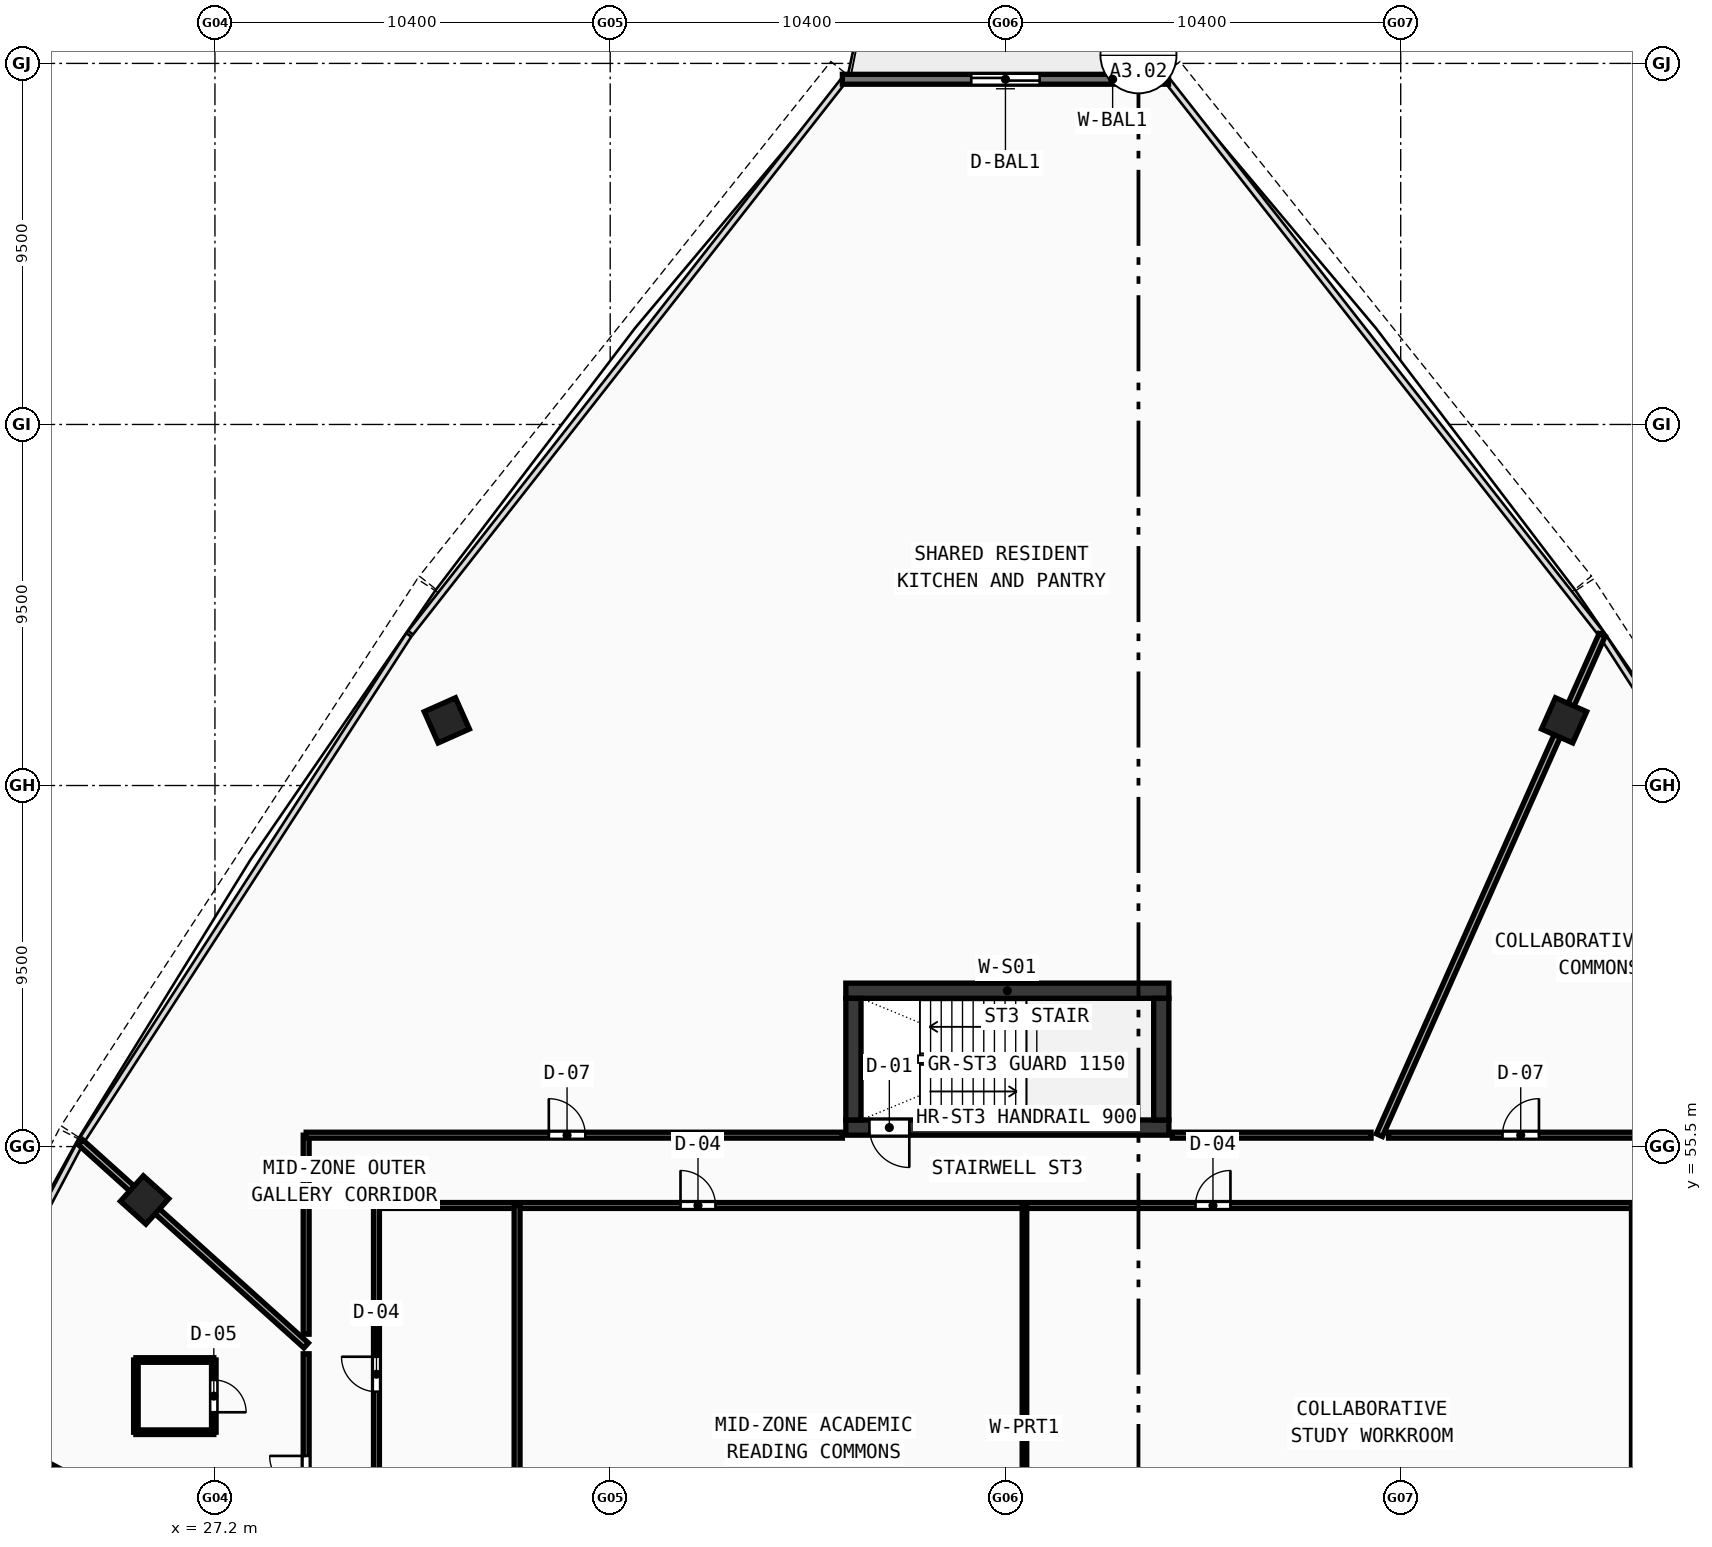
"""IFC4 building model, lengths in metres.
Left out: names, types, materials, properties, quantities, classifications, styles, units other than length and angle.
Written with IfcOpenShell. Run it as: python <this file> out.ifc"""

import sys

from ifc_helpers import new_model, si_unit, direction, frame, frame_2d, origin, origin_with_axes, origin_2d, place, context, subcontext, project, spatial, rectangle, hollow_rectangle, extrude, source, transform, mapped, element, fill, save


model = new_model("IFC4")
c1 = context("Model", 3, precision=1e-05, world=origin(), true_north=direction((0.0, 1.0)))
c2 = subcontext(c1, "Body", "Model", "MODEL_VIEW")
j1 = project(units=[si_unit("LENGTHUNIT", "METRE"), si_unit("PLANEANGLEUNIT", "RADIAN")], contexts=[c1])
p1 = place(None, origin())
s1 = spatial("IfcSite", under=j1, at=p1, CompositionType="ELEMENT")
p2 = place(p1, origin())
s2 = spatial("IfcBuilding", under=s1, at=p2, CompositionType="ELEMENT")
p3 = place(p2, frame((0.0, 0.0, 184.76)))
s3 = spatial("IfcBuildingStorey", under=s2, at=p3, CompositionType="ELEMENT", Elevation=184.76)
p4 = place(p3, frame((43.8, 59.6, 0.0), z_axis=(0.0, 0.0, 1.0), x_axis=(1.0, 0.0, 0.0)))
e1 = element("IfcWall", 1, at=p4, inside=s3, PredefinedType="SHEAR", context=c2, shape_type="SweptSolid", body=[
    extrude(rectangle(XDim=8.5, YDim=0.4, at=frame_2d((4.25, 0.0))), origin(), (0.0, 0.0, 1.0), 3.54),
])
p5 = place(p3, frame((43.8, 56.0, 0.0), z_axis=(0.0, 0.0, 1.0), x_axis=(1.0, 0.0, 0.0)))
e2 = element("IfcWall", 2, at=p5, inside=s3, PredefinedType="SHEAR", context=c2, shape_type="SweptSolid", body=[
    extrude(rectangle(XDim=8.5, YDim=0.4, at=frame_2d((4.25, 0.0))), origin(), (0.0, 0.0, 1.0), 3.54),
])
p6 = place(p5, frame((0.62, 0.0, 0.0)))
e3 = element("IfcOpeningElement", 3, at=p6, cuts=e2, PredefinedType="OPENING", context=c2, shape_type="SweptSolid", body=[
    extrude(rectangle(XDim=1.05, YDim=2.1, at=frame_2d((0.525, 1.05))), frame((0.0, 0.21, 0.0), z_axis=(0.0, -1.0, 0.0), x_axis=(1.0, 0.0, 0.0)), (0.0, 0.0, 1.0), 0.42),
])
for number, where, z_axis, x_axis in (
    (4, (44.0, 56.2, 0.0), (0.0, 0.0, 1.0), (0.0, 1.0, 0.0)),
    (5, (52.1, 56.2, 0.0), (0.0, 0.0, 1.0), (0.0, 1.0, 0.0)),
):
    element("IfcWall", number, at=place(p3, frame(where, z_axis=z_axis, x_axis=x_axis)), inside=s3, PredefinedType="SHEAR", context=c2, shape_type="SweptSolid", body=[
        extrude(rectangle(XDim=3.2, YDim=0.4, at=frame_2d((1.6, 0.0))), origin(), (0.0, 0.0, 1.0), 3.54),
    ])
m1 = source(origin(), c2, "Body", "SweptSolid", [
    extrude(hollow_rectangle(XDim=0.9, YDim=0.9, WallThickness=0.036, at=origin_2d()), origin(), (0.0, 0.0, 1.0), 3.8),
])
for number, where, z_axis, x_axis in (
    (6, (62.699, 66.715, -0.26), (0.0, 0.0, 1.0), (-0.914, 0.407, 0.0)),
    (7, (33.301, 66.715, -0.26), (0.0, 0.0, 1.0), (-0.914, -0.407, 0.0)),
    (8, (25.349, 54.095, -0.26), (0.0, 0.0, 1.0), (-0.669, -0.743, 0.0)),
):
    element("IfcColumn", number, at=place(p3, frame(where, z_axis=z_axis, x_axis=x_axis)), inside=s3, PredefinedType="COLUMN", context=c2, shape_type="MappedRepresentation", body=[
        mapped(m1, transform((0.0, 0.0, 0.0), scale=1.0)),
    ])
p7 = place(p3, frame((52.29, 83.583, 0.0), z_axis=(0.0, 0.0, 1.0), x_axis=(-1.0, 0.0, 0.0)))
e9 = element("IfcWall", 9, at=p7, inside=s3, PredefinedType="STANDARD", context=c2, shape_type="SweptSolid", body=[
    extrude(rectangle(XDim=8.581, YDim=0.26, at=frame_2d((4.29, 0.0))), origin(), (0.0, 0.0, 1.0), 3.54),
])
p8 = place(p7, frame((3.39, 0.0, 0.0)))
e10 = element("IfcOpeningElement", 10, at=p8, cuts=e9, PredefinedType="OPENING", context=c2, shape_type="SweptSolid", body=[
    extrude(rectangle(XDim=1.8, YDim=2.15, at=frame_2d((0.9, 1.075))), frame((0.0, 0.14, 0.0), z_axis=(0.0, -1.0, 0.0), x_axis=(1.0, 0.0, 0.0)), (0.0, 0.0, 1.0), 0.28),
])
p9 = place(p3, frame((31.45, 53.95, 0.0), z_axis=(0.0, 0.0, 1.0), x_axis=(1.0, 0.0, 0.0)))
e11 = element("IfcWall", 11, at=p9, inside=s3, PredefinedType="PARTITIONING", context=c2, shape_type="SweptSolid", body=[
    extrude(rectangle(XDim=33.1, YDim=0.155, at=frame_2d((16.55, 0.0))), origin(), (0.0, 0.0, 1.0), 2.89),
])
p10 = place(p9, frame((8.0, 0.0, 0.0)))
e12 = element("IfcOpeningElement", 12, at=p10, cuts=e11, PredefinedType="OPENING", context=c2, shape_type="SweptSolid", body=[
    extrude(rectangle(XDim=0.92, YDim=2.1, at=frame_2d((0.46, 1.05))), frame((0.0, 0.087, 0.0), z_axis=(0.0, -1.0, 0.0), x_axis=(1.0, 0.0, 0.0)), (0.0, 0.0, 1.0), 0.175),
])
p11 = place(p9, frame((21.55, 0.0, 0.0)))
e13 = element("IfcOpeningElement", 13, at=p11, cuts=e11, PredefinedType="OPENING", context=c2, shape_type="SweptSolid", body=[
    extrude(rectangle(XDim=0.92, YDim=2.1, at=frame_2d((0.46, 1.05))), frame((0.0, 0.087, 0.0), z_axis=(0.0, -1.0, 0.0), x_axis=(1.0, 0.0, 0.0)), (0.0, 0.0, 1.0), 0.175),
])
p12 = place(p3, frame((31.45, 42.25, 0.0), z_axis=(0.0, 0.0, 1.0), x_axis=(0.0, 1.0, 0.0)))
e14 = element("IfcWall", 14, at=p12, inside=s3, PredefinedType="PARTITIONING", context=c2, shape_type="SweptSolid", body=[
    extrude(rectangle(XDim=11.7, YDim=0.155, at=frame_2d((5.85, 0.0))), origin(), (0.0, 0.0, 1.0), 2.89),
])
p13 = place(p12, frame((1.4, 0.0, 0.0)))
e15 = element("IfcOpeningElement", 15, at=p13, cuts=e14, PredefinedType="OPENING", context=c2, shape_type="SweptSolid", body=[
    extrude(rectangle(XDim=0.94, YDim=2.1, at=frame_2d((0.47, 1.05))), frame((0.0, 0.087, 0.0), z_axis=(0.0, -1.0, 0.0), x_axis=(1.0, 0.0, 0.0)), (0.0, 0.0, 1.0), 0.175),
])
p14 = place(p12, frame((6.8, 0.0, 0.0)))
e16 = element("IfcOpeningElement", 16, at=p14, cuts=e14, PredefinedType="OPENING", context=c2, shape_type="SweptSolid", body=[
    extrude(rectangle(XDim=0.92, YDim=2.1, at=frame_2d((0.46, 1.05))), frame((0.0, 0.087, 0.0), z_axis=(0.0, -1.0, 0.0), x_axis=(1.0, 0.0, 0.0)), (0.0, 0.0, 1.0), 0.175),
])
for number, where, z_axis, x_axis in (
    (17, (64.55, 42.25, 0.0), (0.0, 0.0, 1.0), (0.0, 1.0, 0.0)),
    (18, (35.15, 42.25, 0.0), (0.0, 0.0, 1.0), (0.0, 1.0, 0.0)),
):
    element("IfcWall", number, at=place(p3, frame(where, z_axis=z_axis, x_axis=x_axis)), inside=s3, PredefinedType="PARTITIONING", context=c2, shape_type="SweptSolid", body=[
        extrude(rectangle(XDim=11.7, YDim=0.155, at=frame_2d((5.85, 0.0))), origin(), (0.0, 0.0, 1.0), 2.89),
    ])
p15 = place(p3, frame((48.5, 42.25, 0.0), z_axis=(0.0, 0.0, 1.0), x_axis=(0.0, 1.0, 0.0)))
e19 = element("IfcWall", 19, at=p15, inside=s3, PredefinedType="PARTITIONING", context=c2, shape_type="SweptSolid", body=[
    extrude(rectangle(XDim=11.7, YDim=0.12, at=frame_2d((5.85, 0.0))), origin(), (0.0, 0.0, 1.0), 3.14),
])
p16 = place(p3, frame((57.84, 55.8, 0.0), z_axis=(0.0, 0.0, 1.0), x_axis=(0.40674529891, 0.913541603768, 0.0)))
e20 = element("IfcWall", 20, at=p16, inside=s3, PredefinedType="PARTITIONING", context=c2, shape_type="SweptSolid", body=[
    extrude(rectangle(XDim=14.407, YDim=0.175, at=frame_2d((7.203, 0.0))), origin(), (0.0, 0.0, 1.0), 2.89),
])
p17 = place(p3, frame((29.6, 50.267, 0.0), z_axis=(0.0, 0.0, 1.0), x_axis=(-0.743139097079, 0.669136968335, 0.0)))
e21 = element("IfcWall", 21, at=p17, inside=s3, PredefinedType="PARTITIONING", context=c2, shape_type="SweptSolid", body=[
    extrude(rectangle(XDim=7.987, YDim=0.175, at=frame_2d((3.994, 0.0))), origin(), (0.0, 0.0, 1.0), 2.89),
])
p18 = place(p3, frame((29.6, 43.483, 0.0), z_axis=(0.0, 0.0, 1.0), x_axis=(-0.882940086537, 0.469485679853, 0.0)))
e22 = element("IfcWall", 22, at=p18, inside=s3, PredefinedType="PARTITIONING", context=c2, shape_type="SweptSolid", body=[
    extrude(rectangle(XDim=10.91, YDim=0.175, at=frame_2d((5.455, 0.0))), origin(), (0.0, 0.0, 1.0), 2.89),
])
p19 = place(p3, frame((29.6, 43.733, 0.0), z_axis=(0.0, 0.0, 1.0), x_axis=(0.0, 1.0, 0.0)))
e23 = element("IfcWall", 23, at=p19, inside=s3, PredefinedType="PARTITIONING", context=c2, shape_type="SweptSolid", body=[
    extrude(rectangle(XDim=6.315, YDim=0.155, at=frame_2d((3.157, 0.0))), origin(), (0.0, 0.0, 1.0), 2.89),
])
p20 = place(p19, frame((2.668, 0.0, 0.0)))
e24 = element("IfcOpeningElement", 24, at=p20, cuts=e23, PredefinedType="OPENING", context=c2, shape_type="SweptSolid", body=[
    extrude(rectangle(XDim=0.96, YDim=2.12, at=frame_2d((0.48, 1.06))), frame((0.0, 0.087, 0.0), z_axis=(0.0, -1.0, 0.0), x_axis=(1.0, 0.0, 0.0)), (0.0, 0.0, 1.0), 0.175),
])
p21 = place(p3, frame((29.6, 50.563, 0.0), z_axis=(0.0, 0.0, 1.0), x_axis=(0.0, 1.0, 0.0)))
e25 = element("IfcWall", 25, at=p21, inside=s3, PredefinedType="PARTITIONING", context=c2, shape_type="SweptSolid", body=[
    extrude(rectangle(XDim=5.237, YDim=0.155, at=frame_2d((2.618, 0.0))), origin(), (0.0, 0.0, 1.0), 3.54),
])
p22 = place(p3, frame((29.6, 55.8, 0.0), z_axis=(0.0, 0.0, 1.0), x_axis=(1.0, 0.0, 0.0)))
e26 = element("IfcWall", 26, at=p22, inside=s3, PredefinedType="PARTITIONING", context=c2, shape_type="SweptSolid", body=[
    extrude(rectangle(XDim=14.109, YDim=0.155, at=frame_2d((7.054, 0.0))), origin(), (0.0, 0.0, 1.0), 2.89),
])
p23 = place(p22, frame((6.385, 0.0, 0.0)))
e27 = element("IfcOpeningElement", 27, at=p23, cuts=e26, PredefinedType="OPENING", context=c2, shape_type="SweptSolid", body=[
    extrude(rectangle(XDim=0.96, YDim=2.12, at=frame_2d((0.48, 1.06))), frame((0.0, 0.087, 0.0), z_axis=(0.0, -1.0, 0.0), x_axis=(1.0, 0.0, 0.0)), (0.0, 0.0, 1.0), 0.175),
])
p24 = place(p3, frame((52.391, 55.8, 0.0), z_axis=(0.0, 0.0, 1.0), x_axis=(1.0, 0.0, 0.0)))
e28 = element("IfcWall", 28, at=p24, inside=s3, PredefinedType="PARTITIONING", context=c2, shape_type="SweptSolid", body=[
    extrude(rectangle(XDim=5.229, YDim=0.155, at=frame_2d((2.614, 0.0))), origin(), (0.0, 0.0, 1.0), 2.89),
])
p25 = place(p3, frame((58.08, 55.8, 0.0), z_axis=(0.0, 0.0, 1.0), x_axis=(1.0, 0.0, 0.0)))
e29 = element("IfcWall", 29, at=p25, inside=s3, PredefinedType="PARTITIONING", context=c2, shape_type="SweptSolid", body=[
    extrude(rectangle(XDim=6.966, YDim=0.155, at=frame_2d((3.483, 0.0))), origin(), (0.0, 0.0, 1.0), 3.14),
])
p26 = place(p25, frame((2.998, 0.0, 0.0)))
e30 = element("IfcOpeningElement", 30, at=p26, cuts=e29, PredefinedType="OPENING", context=c2, shape_type="SweptSolid", body=[
    extrude(rectangle(XDim=0.96, YDim=2.12, at=frame_2d((0.48, 1.06))), frame((0.0, 0.087, 0.0), z_axis=(0.0, -1.0, 0.0), x_axis=(1.0, 0.0, 0.0)), (0.0, 0.0, 1.0), 0.175),
])
p27 = place(p3, frame((25.12, 47.984, 0.0), z_axis=(0.0, 0.0, 1.0), x_axis=(1.0, 0.0, 0.0)))
e31 = element("IfcWall", 31, at=p27, inside=s3, PredefinedType="PARTITIONING", context=c2, shape_type="SweptSolid", body=[
    extrude(rectangle(XDim=2.05, YDim=0.12, at=frame_2d((1.025, 0.0))), origin(), (0.0, 0.0, 1.0), 3.54),
])
p28 = place(p3, frame((27.17, 47.984, 0.0), z_axis=(0.0, 0.0, 1.0), x_axis=(0.0, 1.0, 0.0)))
e32 = element("IfcWall", 32, at=p28, inside=s3, PredefinedType="PARTITIONING", context=c2, shape_type="SweptSolid", body=[
    extrude(rectangle(XDim=1.9, YDim=0.12, at=frame_2d((0.95, 0.0))), origin(), (0.0, 0.0, 1.0), 3.54),
])
p29 = place(p28, frame((0.525, 0.0, 0.0)))
e33 = element("IfcOpeningElement", 33, at=p29, cuts=e32, PredefinedType="OPENING", context=c2, shape_type="SweptSolid", body=[
    extrude(rectangle(XDim=0.85, YDim=2.1, at=frame_2d((0.425, 1.05))), frame((0.0, 0.07, 0.0), z_axis=(0.0, -1.0, 0.0), x_axis=(1.0, 0.0, 0.0)), (0.0, 0.0, 1.0), 0.14),
])
p30 = place(p3, frame((27.17, 49.884, 0.0), z_axis=(0.0, 0.0, 1.0), x_axis=(-1.0, 0.0, 0.0)))
e34 = element("IfcWall", 34, at=p30, inside=s3, PredefinedType="PARTITIONING", context=c2, shape_type="SweptSolid", body=[
    extrude(rectangle(XDim=2.05, YDim=0.12, at=frame_2d((1.025, 0.0))), origin(), (0.0, 0.0, 1.0), 3.54),
])
p31 = place(p3, frame((25.12, 49.884, 0.0), z_axis=(0.0, 0.0, 1.0), x_axis=(0.0, -1.0, 0.0)))
e35 = element("IfcWall", 35, at=p31, inside=s3, PredefinedType="PARTITIONING", context=c2, shape_type="SweptSolid", body=[
    extrude(rectangle(XDim=1.9, YDim=0.12, at=frame_2d((0.95, 0.0))), origin(), (0.0, 0.0, 1.0), 3.54),
])
m2 = source(origin(), c2, "Body", "SweptSolid", [
    extrude(rectangle(XDim=1.8, YDim=2.15, at=frame_2d((0.9, 1.075))), frame((0.0, 0.025, 0.0), z_axis=(0.0, -1.0, 0.0), x_axis=(1.0, 0.0, 0.0)), (0.0, 0.0, 1.0), 0.05),
])
p32 = place(p8, origin_with_axes())
e36 = element("IfcDoor", 36, at=p32, inside=s3, OperationType="DOUBLE_DOOR_SLIDING", PredefinedType="DOOR", context=c2, shape_type="MappedRepresentation", body=[
    mapped(m2, transform((0.0, 0.0, 0.0), scale=1.0)),
])
fill(e10, e36)
m3 = source(origin(), c2, "Body", "SweptSolid", [
    extrude(rectangle(XDim=1.05, YDim=2.1, at=frame_2d((0.525, 1.05))), frame((0.0, 0.025, 0.0), z_axis=(0.0, -1.0, 0.0), x_axis=(1.0, 0.0, 0.0)), (0.0, 0.0, 1.0), 0.05),
])
p33 = place(p6, frame((1.05, 0.0, 0.0), z_axis=(0.0, 0.0, 1.0), x_axis=(-1.0, 0.0, 0.0)))
e37 = element("IfcDoor", 37, at=p33, inside=s3, OperationType="SINGLE_SWING_LEFT", PredefinedType="DOOR", context=c2, shape_type="MappedRepresentation", body=[
    mapped(m3, transform((0.0, 0.0, 0.0), scale=1.0)),
])
fill(e3, e37)
m4 = source(origin(), c2, "Body", "SweptSolid", [
    extrude(rectangle(XDim=0.92, YDim=2.1, at=frame_2d((0.46, 1.05))), frame((0.0, 0.025, 0.0), z_axis=(0.0, -1.0, 0.0), x_axis=(1.0, 0.0, 0.0)), (0.0, 0.0, 1.0), 0.05),
])
p34 = place(p14, origin_with_axes())
e38 = element("IfcDoor", 38, at=p34, inside=s3, OperationType="SINGLE_SWING_RIGHT", PredefinedType="DOOR", context=c2, shape_type="MappedRepresentation", body=[
    mapped(m4, transform((0.0, 0.0, 0.0), scale=1.0)),
])
fill(e16, e38)
p35 = place(p10, origin_with_axes())
e39 = element("IfcDoor", 39, at=p35, inside=s3, OperationType="SINGLE_SWING_LEFT", PredefinedType="DOOR", context=c2, shape_type="MappedRepresentation", body=[
    mapped(m4, transform((0.0, 0.0, 0.0), scale=1.0)),
])
fill(e12, e39)
p36 = place(p11, origin_with_axes())
e40 = element("IfcDoor", 40, at=p36, inside=s3, OperationType="SINGLE_SWING_RIGHT", PredefinedType="DOOR", context=c2, shape_type="MappedRepresentation", body=[
    mapped(m4, transform((0.0, 0.0, 0.0), scale=1.0)),
])
fill(e13, e40)
m5 = source(origin(), c2, "Body", "SweptSolid", [
    extrude(rectangle(XDim=0.96, YDim=2.12, at=frame_2d((0.48, 1.06))), frame((0.0, 0.025, 0.0), z_axis=(0.0, -1.0, 0.0), x_axis=(1.0, 0.0, 0.0)), (0.0, 0.0, 1.0), 0.05),
])
p37 = place(p26, origin_with_axes())
e41 = element("IfcDoor", 41, at=p37, inside=s3, OperationType="SINGLE_SWING_RIGHT", PredefinedType="DOOR", context=c2, shape_type="MappedRepresentation", body=[
    mapped(m5, transform((0.0, 0.0, 0.0), scale=1.0)),
])
fill(e30, e41)
p38 = place(p23, origin_with_axes())
e42 = element("IfcDoor", 42, at=p38, inside=s3, OperationType="SINGLE_SWING_LEFT", PredefinedType="DOOR", context=c2, shape_type="MappedRepresentation", body=[
    mapped(m5, transform((0.0, 0.0, 0.0), scale=1.0)),
])
fill(e27, e42)
p39 = place(p20, origin_with_axes())
e43 = element("IfcDoor", 43, at=p39, inside=s3, OperationType="SINGLE_SWING_RIGHT", PredefinedType="DOOR", context=c2, shape_type="MappedRepresentation", body=[
    mapped(m5, transform((0.0, 0.0, 0.0), scale=1.0)),
])
fill(e24, e43)
m6 = source(origin(), c2, "Body", "SweptSolid", [
    extrude(rectangle(XDim=0.85, YDim=2.1, at=frame_2d((0.425, 1.05))), frame((0.0, 0.025, 0.0), z_axis=(0.0, -1.0, 0.0), x_axis=(1.0, 0.0, 0.0)), (0.0, 0.0, 1.0), 0.05),
])
p40 = place(p29, frame((0.85, 0.0, 0.0), z_axis=(0.0, 0.0, 1.0), x_axis=(-1.0, 0.0, 0.0)))
e44 = element("IfcDoor", 44, at=p40, inside=s3, OperationType="SINGLE_SWING_RIGHT", PredefinedType="DOOR", context=c2, shape_type="MappedRepresentation", body=[
    mapped(m6, transform((0.0, 0.0, 0.0), scale=1.0)),
])
fill(e33, e44)
save(model, sys.argv[1])
